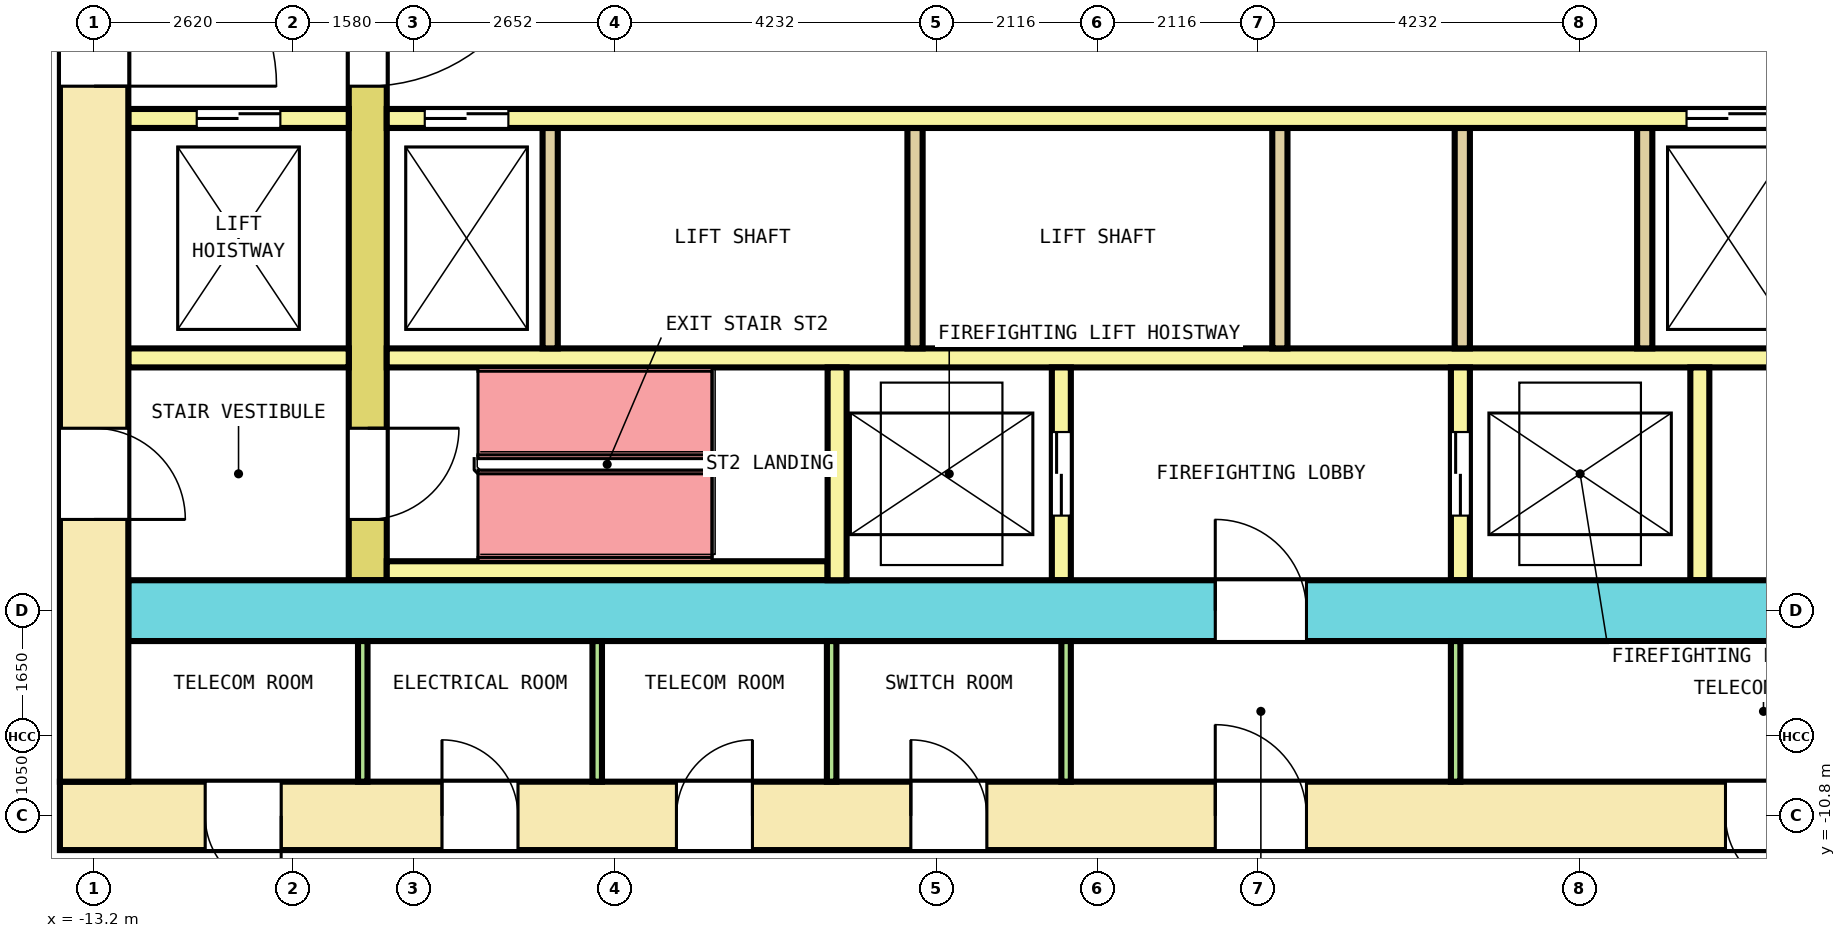
"""IFC4 building model, lengths in metres.
Left out: names, types, materials, properties, quantities, classifications, styles, units other than length and angle.
Written with IfcOpenShell. Run it as: python <this file> out.ifc"""

import sys

from ifc_helpers import new_model, si_unit, direction, frame, frame_2d, origin, place, context, subcontext, project, spatial, rectangle, extrude, element, fill, save


model = new_model("IFC4")
c1 = context("Model", 3, precision=1e-05, world=origin(), true_north=direction((0.0, 1.0)))
c2 = subcontext(c1, "Body", "Model", "MODEL_VIEW")
j1 = project(units=[si_unit("LENGTHUNIT", "METRE"), si_unit("PLANEANGLEUNIT", "RADIAN")], contexts=[c1])
p1 = place(None, origin())
s1 = spatial("IfcSite", under=j1, at=p1, CompositionType="ELEMENT")
p2 = place(p1, origin())
s2 = spatial("IfcBuilding", under=s1, at=p2, CompositionType="ELEMENT")
p3 = place(p2, frame((0.0, 0.0, 49.8)))
s3 = spatial("IfcBuildingStorey", under=s2, at=p3, CompositionType="ELEMENT", Elevation=49.8)
p4 = place(p3, frame((-13.65, -10.8, 0.0), z_axis=(0.0, 0.0, 1.0), x_axis=(1.0, 0.0, 0.0)))
e1 = element("IfcWall", 1, at=p4, inside=s3, PredefinedType="SHEAR", context=c2, shape_type="SweptSolid", body=[
    extrude(rectangle(XDim=27.3, YDim=0.9, at=frame_2d((13.65, 0.0))), origin(), (0.0, 0.0, 1.0), 4.1),
])
p5 = place(p4, frame((1.911, 0.0, 0.0)))
e2 = element("IfcOpeningElement", 2, at=p5, cuts=e1, PredefinedType="OPENING", context=c2, shape_type="SweptSolid", body=[
    extrude(rectangle(XDim=1.0, YDim=2.1, at=frame_2d((0.5, 1.05))), frame((0.0, 0.46, 0.0), z_axis=(0.0, -1.0, 0.0), x_axis=(1.0, 0.0, 0.0)), (0.0, 0.0, 1.0), 0.92),
])
p6 = place(p4, frame((5.027, 0.0, 0.0)))
e3 = element("IfcOpeningElement", 3, at=p6, cuts=e1, PredefinedType="OPENING", context=c2, shape_type="SweptSolid", body=[
    extrude(rectangle(XDim=1.0, YDim=2.1, at=frame_2d((0.5, 1.05))), frame((0.0, 0.46, 0.0), z_axis=(0.0, -1.0, 0.0), x_axis=(1.0, 0.0, 0.0)), (0.0, 0.0, 1.0), 0.92),
])
p7 = place(p4, frame((8.111, 0.0, 0.0)))
e4 = element("IfcOpeningElement", 4, at=p7, cuts=e1, PredefinedType="OPENING", context=c2, shape_type="SweptSolid", body=[
    extrude(rectangle(XDim=1.0, YDim=2.1, at=frame_2d((0.5, 1.05))), frame((0.0, 0.46, 0.0), z_axis=(0.0, -1.0, 0.0), x_axis=(1.0, 0.0, 0.0)), (0.0, 0.0, 1.0), 0.92),
])
p8 = place(p4, frame((11.195, 0.0, 0.0)))
e5 = element("IfcOpeningElement", 5, at=p8, cuts=e1, PredefinedType="OPENING", context=c2, shape_type="SweptSolid", body=[
    extrude(rectangle(XDim=1.0, YDim=2.1, at=frame_2d((0.5, 1.05))), frame((0.0, 0.46, 0.0), z_axis=(0.0, -1.0, 0.0), x_axis=(1.0, 0.0, 0.0)), (0.0, 0.0, 1.0), 0.92),
])
p9 = place(p4, frame((21.913, 0.0, 0.0)))
e6 = element("IfcOpeningElement", 6, at=p9, cuts=e1, PredefinedType="OPENING", context=c2, shape_type="SweptSolid", body=[
    extrude(rectangle(XDim=1.0, YDim=2.1, at=frame_2d((0.5, 1.05))), frame((0.0, 0.46, 0.0), z_axis=(0.0, -1.0, 0.0), x_axis=(1.0, 0.0, 0.0)), (0.0, 0.0, 1.0), 0.92),
])
p10 = place(p4, frame((15.2, 0.0, 0.0)))
e7 = element("IfcOpeningElement", 7, at=p10, cuts=e1, PredefinedType="OPENING", context=c2, shape_type="SweptSolid", body=[
    extrude(rectangle(XDim=1.2, YDim=2.1, at=frame_2d((0.6, 1.05))), frame((0.0, 0.46, 0.0), z_axis=(0.0, -1.0, 0.0), x_axis=(1.0, 0.0, 0.0)), (0.0, 0.0, 1.0), 0.92),
])
p11 = place(p3, frame((-13.2, -10.35, 0.0), z_axis=(0.0, 0.0, 1.0), x_axis=(0.0, 1.0, 0.0)))
e8 = element("IfcWall", 8, at=p11, inside=s3, PredefinedType="SHEAR", context=c2, shape_type="SweptSolid", body=[
    extrude(rectangle(XDim=20.7, YDim=0.9, at=frame_2d((10.35, 0.0))), origin(), (0.0, 0.0, 1.0), 4.1),
])
p12 = place(p11, frame((9.15, 0.0, 0.0)))
e9 = element("IfcOpeningElement", 9, at=p12, cuts=e8, PredefinedType="OPENING", context=c2, shape_type="SweptSolid", body=[
    extrude(rectangle(XDim=2.4, YDim=2.1, at=frame_2d((1.2, 1.05))), frame((0.0, 0.46, 0.0), z_axis=(0.0, -1.0, 0.0), x_axis=(1.0, 0.0, 0.0)), (0.0, 0.0, 1.0), 0.92),
])
p13 = place(p11, frame((16.05, 0.0, 0.0)))
e10 = element("IfcOpeningElement", 10, at=p13, cuts=e8, PredefinedType="OPENING", context=c2, shape_type="SweptSolid", body=[
    extrude(rectangle(XDim=1.2, YDim=2.1, at=frame_2d((0.6, 1.05))), frame((0.0, 0.46, 0.0), z_axis=(0.0, -1.0, 0.0), x_axis=(1.0, 0.0, 0.0)), (0.0, 0.0, 1.0), 0.92),
])
p14 = place(p11, frame((3.45, 0.0, 0.0)))
e11 = element("IfcOpeningElement", 11, at=p14, cuts=e8, PredefinedType="OPENING", context=c2, shape_type="SweptSolid", body=[
    extrude(rectangle(XDim=1.2, YDim=2.1, at=frame_2d((0.6, 1.05))), frame((0.0, 0.46, 0.0), z_axis=(0.0, -1.0, 0.0), x_axis=(1.0, 0.0, 0.0)), (0.0, 0.0, 1.0), 0.92),
])
p15 = place(p3, frame((-12.75, -8.1, 0.0), z_axis=(0.0, 0.0, 1.0), x_axis=(1.0, 0.0, 0.0)))
e12 = element("IfcWall", 12, at=p15, inside=s3, PredefinedType="SHEAR", context=c2, shape_type="SweptSolid", body=[
    extrude(rectangle(XDim=25.5, YDim=0.8, at=frame_2d((12.75, 0.0))), origin(), (0.0, 0.0, 1.0), 4.1),
])
p16 = place(p15, frame((14.3, 0.0, 0.0)))
e13 = element("IfcOpeningElement", 13, at=p16, cuts=e12, PredefinedType="OPENING", context=c2, shape_type="SweptSolid", body=[
    extrude(rectangle(XDim=1.2, YDim=2.1, at=frame_2d((0.6, 1.05))), frame((0.0, 0.41, 0.0), z_axis=(0.0, -1.0, 0.0), x_axis=(1.0, 0.0, 0.0)), (0.0, 0.0, 1.0), 0.82),
])
p17 = place(p3, frame((-9.6, -7.7, 0.0), z_axis=(0.0, 0.0, 1.0), x_axis=(0.0, 1.0, 0.0)))
e14 = element("IfcWall", 14, at=p17, inside=s3, PredefinedType="SHEAR", context=c2, shape_type="SweptSolid", body=[
    extrude(rectangle(XDim=15.4, YDim=0.5, at=frame_2d((7.7, 0.0))), origin(), (0.0, 0.0, 1.0), 4.1),
])
p18 = place(p17, frame((6.5, 0.0, 0.0)))
e15 = element("IfcOpeningElement", 15, at=p18, cuts=e14, PredefinedType="OPENING", context=c2, shape_type="SweptSolid", body=[
    extrude(rectangle(XDim=2.4, YDim=2.1, at=frame_2d((1.2, 1.05))), frame((0.0, 0.26, 0.0), z_axis=(0.0, -1.0, 0.0), x_axis=(1.0, 0.0, 0.0)), (0.0, 0.0, 1.0), 0.52),
])
p19 = place(p17, frame((13.4, 0.0, 0.0)))
e16 = element("IfcOpeningElement", 16, at=p19, cuts=e14, PredefinedType="OPENING", context=c2, shape_type="SweptSolid", body=[
    extrude(rectangle(XDim=1.2, YDim=2.1, at=frame_2d((0.6, 1.05))), frame((0.0, 0.26, 0.0), z_axis=(0.0, -1.0, 0.0), x_axis=(1.0, 0.0, 0.0)), (0.0, 0.0, 1.0), 0.52),
])
p20 = place(p17, frame((0.8, 0.0, 0.0)))
e17 = element("IfcOpeningElement", 17, at=p20, cuts=e14, PredefinedType="OPENING", context=c2, shape_type="SweptSolid", body=[
    extrude(rectangle(XDim=1.2, YDim=2.1, at=frame_2d((0.6, 1.05))), frame((0.0, 0.26, 0.0), z_axis=(0.0, -1.0, 0.0), x_axis=(1.0, 0.0, 0.0)), (0.0, 0.0, 1.0), 0.52),
])
p21 = place(p3, frame((-12.75, -1.625, 0.0), z_axis=(0.0, 0.0, 1.0), x_axis=(1.0, 0.0, 0.0)))
e18 = element("IfcWall", 18, at=p21, inside=s3, PredefinedType="SOLIDWALL", context=c2, shape_type="SweptSolid", body=[
    extrude(rectangle(XDim=2.9, YDim=0.25, at=frame_2d((1.45, 0.0))), origin(), (0.0, 0.0, 1.0), 4.1),
])
p22 = place(p21, frame((0.9, 0.0, 0.0)))
e19 = element("IfcOpeningElement", 19, at=p22, cuts=e18, PredefinedType="OPENING", context=c2, shape_type="SweptSolid", body=[
    extrude(rectangle(XDim=1.1, YDim=2.1, at=frame_2d((0.55, 1.05))), frame((0.0, 0.135, 0.0), z_axis=(0.0, -1.0, 0.0), x_axis=(1.0, 0.0, 0.0)), (0.0, 0.0, 1.0), 0.27),
])
p23 = place(p3, frame((-9.35, -1.625, 0.0), z_axis=(0.0, 0.0, 1.0), x_axis=(1.0, 0.0, 0.0)))
e20 = element("IfcWall", 20, at=p23, inside=s3, PredefinedType="SOLIDWALL", context=c2, shape_type="SweptSolid", body=[
    extrude(rectangle(XDim=18.7, YDim=0.25, at=frame_2d((9.35, 0.0))), origin(), (0.0, 0.0, 1.0), 4.1),
])
p24 = place(p23, frame((0.5, 0.0, 0.0)))
e21 = element("IfcOpeningElement", 21, at=p24, cuts=e20, PredefinedType="OPENING", context=c2, shape_type="SweptSolid", body=[
    extrude(rectangle(XDim=1.1, YDim=2.1, at=frame_2d((0.55, 1.05))), frame((0.0, 0.135, 0.0), z_axis=(0.0, -1.0, 0.0), x_axis=(1.0, 0.0, 0.0)), (0.0, 0.0, 1.0), 0.27),
])
p25 = place(p23, frame((17.1, 0.0, 0.0)))
e22 = element("IfcOpeningElement", 22, at=p25, cuts=e20, PredefinedType="OPENING", context=c2, shape_type="SweptSolid", body=[
    extrude(rectangle(XDim=1.1, YDim=2.1, at=frame_2d((0.55, 1.05))), frame((0.0, 0.135, 0.0), z_axis=(0.0, -1.0, 0.0), x_axis=(1.0, 0.0, 0.0)), (0.0, 0.0, 1.0), 0.27),
])
p26 = place(p3, frame((-12.75, -4.775, 0.0), z_axis=(0.0, 0.0, 1.0), x_axis=(1.0, 0.0, 0.0)))
e23 = element("IfcWall", 23, at=p26, inside=s3, PredefinedType="SOLIDWALL", context=c2, shape_type="SweptSolid", body=[
    extrude(rectangle(XDim=2.9, YDim=0.25, at=frame_2d((1.45, 0.0))), origin(), (0.0, 0.0, 1.0), 4.1),
])
p27 = place(p3, frame((-9.35, -4.775, 0.0), z_axis=(0.0, 0.0, 1.0), x_axis=(1.0, 0.0, 0.0)))
e24 = element("IfcWall", 24, at=p27, inside=s3, PredefinedType="SOLIDWALL", context=c2, shape_type="SweptSolid", body=[
    extrude(rectangle(XDim=18.7, YDim=0.25, at=frame_2d((9.35, 0.0))), origin(), (0.0, 0.0, 1.0), 4.1),
])
for number, where, z_axis, x_axis in (
    (25, (-7.2, -4.65, 0.0), (0.0, 0.0, 1.0), (0.0, 1.0, 0.0)),
    (26, (-2.4, -4.65, 0.0), (0.0, 0.0, 1.0), (0.0, 1.0, 0.0)),
    (27, (2.4, -4.65, 0.0), (0.0, 0.0, 1.0), (0.0, 1.0, 0.0)),
    (28, (4.8, -4.65, 0.0), (0.0, 0.0, 1.0), (0.0, 1.0, 0.0)),
    (29, (7.2, -4.65, 0.0), (0.0, 0.0, 1.0), (0.0, 1.0, 0.0)),
):
    element("IfcWall", number, at=place(p3, frame(where, z_axis=z_axis, x_axis=x_axis)), inside=s3, PredefinedType="SOLIDWALL", context=c2, shape_type="SweptSolid", body=[
        extrude(rectangle(XDim=2.9, YDim=0.2, at=frame_2d((1.45, 0.0))), origin(), (0.0, 0.0, 1.0), 4.1),
    ])
p28 = place(p3, frame((-9.35, -7.575, 0.0), z_axis=(0.0, 0.0, 1.0), x_axis=(1.0, 0.0, 0.0)))
e30 = element("IfcWall", 30, at=p28, inside=s3, PredefinedType="SOLIDWALL", context=c2, shape_type="SweptSolid", body=[
    extrude(rectangle(XDim=5.8, YDim=0.25, at=frame_2d((2.9, 0.0))), origin(), (0.0, 0.0, 1.0), 4.1),
])
p29 = place(p3, frame((-3.425, -7.7, 0.0), z_axis=(0.0, 0.0, 1.0), x_axis=(0.0, 1.0, 0.0)))
e31 = element("IfcWall", 31, at=p29, inside=s3, PredefinedType="SOLIDWALL", context=c2, shape_type="SweptSolid", body=[
    extrude(rectangle(XDim=2.8, YDim=0.25, at=frame_2d((1.4, 0.0))), origin(), (0.0, 0.0, 1.0), 4.1),
])
p30 = place(p3, frame((-0.475, -7.7, 0.0), z_axis=(0.0, 0.0, 1.0), x_axis=(0.0, 1.0, 0.0)))
e32 = element("IfcWall", 32, at=p30, inside=s3, PredefinedType="SOLIDWALL", context=c2, shape_type="SweptSolid", body=[
    extrude(rectangle(XDim=2.8, YDim=0.25, at=frame_2d((1.4, 0.0))), origin(), (0.0, 0.0, 1.0), 4.1),
])
p31 = place(p30, frame((0.85, 0.0, 0.0)))
e33 = element("IfcOpeningElement", 33, at=p31, cuts=e32, PredefinedType="OPENING", context=c2, shape_type="SweptSolid", body=[
    extrude(rectangle(XDim=1.1, YDim=2.1, at=frame_2d((0.55, 1.05))), frame((0.0, 0.135, 0.0), z_axis=(0.0, -1.0, 0.0), x_axis=(1.0, 0.0, 0.0)), (0.0, 0.0, 1.0), 0.27),
])
p32 = place(p3, frame((4.775, -7.7, 0.0), z_axis=(0.0, 0.0, 1.0), x_axis=(0.0, 1.0, 0.0)))
e34 = element("IfcWall", 34, at=p32, inside=s3, PredefinedType="SOLIDWALL", context=c2, shape_type="SweptSolid", body=[
    extrude(rectangle(XDim=2.8, YDim=0.25, at=frame_2d((1.4, 0.0))), origin(), (0.0, 0.0, 1.0), 4.1),
])
p33 = place(p32, frame((0.85, 0.0, 0.0)))
e35 = element("IfcOpeningElement", 35, at=p33, cuts=e34, PredefinedType="OPENING", context=c2, shape_type="SweptSolid", body=[
    extrude(rectangle(XDim=1.1, YDim=2.1, at=frame_2d((0.55, 1.05))), frame((0.0, 0.135, 0.0), z_axis=(0.0, -1.0, 0.0), x_axis=(1.0, 0.0, 0.0)), (0.0, 0.0, 1.0), 0.27),
])
p34 = place(p3, frame((7.925, -7.7, 0.0), z_axis=(0.0, 0.0, 1.0), x_axis=(0.0, 1.0, 0.0)))
e36 = element("IfcWall", 36, at=p34, inside=s3, PredefinedType="SOLIDWALL", context=c2, shape_type="SweptSolid", body=[
    extrude(rectangle(XDim=2.8, YDim=0.25, at=frame_2d((1.4, 0.0))), origin(), (0.0, 0.0, 1.0), 4.1),
])
for number, where, z_axis, x_axis in (
    (37, (-9.666, -10.35, 0.0), (0.0, 0.0, 1.0), (0.0, 1.0, 0.0)),
    (38, (-6.581, -10.35, 0.0), (0.0, 0.0, 1.0), (0.0, 1.0, 0.0)),
    (39, (-3.497, -10.35, 0.0), (0.0, 0.0, 1.0), (0.0, 1.0, 0.0)),
    (40, (-0.413, -10.35, 0.0), (0.0, 0.0, 1.0), (0.0, 1.0, 0.0)),
    (41, (4.712, -10.35, 0.0), (0.0, 0.0, 1.0), (0.0, 1.0, 0.0)),
):
    element("IfcWall", number, at=place(p3, frame(where, z_axis=z_axis, x_axis=x_axis)), inside=s3, PredefinedType="PARTITIONING", context=c2, shape_type="SweptSolid", body=[
        extrude(rectangle(XDim=1.85, YDim=0.125, at=frame_2d((0.925, 0.0))), origin(), (0.0, 0.0, 1.0), 4.1),
    ])
p35 = place(p22, origin())
e42 = element("IfcDoor", 42, at=p35, inside=s3, OperationType="DOUBLE_DOOR_SLIDING", PredefinedType="DOOR", context=c2, shape_type="SweptSolid", body=[
    extrude(rectangle(XDim=1.1, YDim=2.1, at=frame_2d((0.55, 1.05))), frame((0.0, 0.075, 0.0), z_axis=(0.0, -1.0, 0.0), x_axis=(1.0, 0.0, 0.0)), (0.0, 0.0, 1.0), 0.15),
])
fill(e19, e42)
p36 = place(p24, origin())
e43 = element("IfcDoor", 43, at=p36, inside=s3, OperationType="DOUBLE_DOOR_SLIDING", PredefinedType="DOOR", context=c2, shape_type="SweptSolid", body=[
    extrude(rectangle(XDim=1.1, YDim=2.1, at=frame_2d((0.55, 1.05))), frame((0.0, 0.075, 0.0), z_axis=(0.0, -1.0, 0.0), x_axis=(1.0, 0.0, 0.0)), (0.0, 0.0, 1.0), 0.15),
])
fill(e21, e43)
p37 = place(p25, origin())
e44 = element("IfcDoor", 44, at=p37, inside=s3, OperationType="DOUBLE_DOOR_SLIDING", PredefinedType="DOOR", context=c2, shape_type="SweptSolid", body=[
    extrude(rectangle(XDim=1.1, YDim=2.1, at=frame_2d((0.55, 1.05))), frame((0.0, 0.075, 0.0), z_axis=(0.0, -1.0, 0.0), x_axis=(1.0, 0.0, 0.0)), (0.0, 0.0, 1.0), 0.15),
])
fill(e22, e44)
p38 = place(p31, origin())
e45 = element("IfcDoor", 45, at=p38, inside=s3, OperationType="DOUBLE_DOOR_SLIDING", PredefinedType="DOOR", context=c2, shape_type="SweptSolid", body=[
    extrude(rectangle(XDim=1.1, YDim=2.1, at=frame_2d((0.55, 1.05))), frame((0.0, 0.075, 0.0), z_axis=(0.0, -1.0, 0.0), x_axis=(1.0, 0.0, 0.0)), (0.0, 0.0, 1.0), 0.15),
])
fill(e33, e45)
p39 = place(p33, origin())
e46 = element("IfcDoor", 46, at=p39, inside=s3, OperationType="DOUBLE_DOOR_SLIDING", PredefinedType="DOOR", context=c2, shape_type="SweptSolid", body=[
    extrude(rectangle(XDim=1.1, YDim=2.1, at=frame_2d((0.55, 1.05))), frame((0.0, 0.075, 0.0), z_axis=(0.0, -1.0, 0.0), x_axis=(1.0, 0.0, 0.0)), (0.0, 0.0, 1.0), 0.15),
])
fill(e35, e46)
p40 = place(p18, origin())
e47 = element("IfcDoor", 47, at=p40, inside=s3, OperationType="DOUBLE_DOOR_SINGLE_SWING", PredefinedType="DOOR", context=c2, shape_type="SweptSolid", body=[
    extrude(rectangle(XDim=2.4, YDim=2.1, at=frame_2d((1.2, 1.05))), frame((0.0, 0.2, 0.0), z_axis=(0.0, -1.0, 0.0), x_axis=(1.0, 0.0, 0.0)), (0.0, 0.0, 1.0), 0.4),
])
fill(e15, e47)
p41 = place(p12, origin())
e48 = element("IfcDoor", 48, at=p41, inside=s3, OperationType="DOUBLE_DOOR_SINGLE_SWING", PredefinedType="DOOR", context=c2, shape_type="SweptSolid", body=[
    extrude(rectangle(XDim=2.4, YDim=2.1, at=frame_2d((1.2, 1.05))), frame((0.0, 0.3, 0.0), z_axis=(0.0, -1.0, 0.0), x_axis=(1.0, 0.0, 0.0)), (0.0, 0.0, 1.0), 0.6),
])
fill(e9, e48)
p42 = place(p20, origin())
e49 = element("IfcDoor", 49, at=p42, inside=s3, OperationType="SINGLE_SWING_RIGHT", PredefinedType="DOOR", context=c2, shape_type="SweptSolid", body=[
    extrude(rectangle(XDim=1.2, YDim=2.1, at=frame_2d((0.6, 1.05))), frame((0.0, 0.2, 0.0), z_axis=(0.0, -1.0, 0.0), x_axis=(1.0, 0.0, 0.0)), (0.0, 0.0, 1.0), 0.4),
])
fill(e17, e49)
p43 = place(p14, origin())
e50 = element("IfcDoor", 50, at=p43, inside=s3, OperationType="SINGLE_SWING_LEFT", PredefinedType="DOOR", context=c2, shape_type="SweptSolid", body=[
    extrude(rectangle(XDim=1.2, YDim=2.1, at=frame_2d((0.6, 1.05))), frame((0.0, 0.3, 0.0), z_axis=(0.0, -1.0, 0.0), x_axis=(1.0, 0.0, 0.0)), (0.0, 0.0, 1.0), 0.6),
])
fill(e11, e50)
p44 = place(p16, origin())
e51 = element("IfcDoor", 51, at=p44, inside=s3, OperationType="SINGLE_SWING_RIGHT", PredefinedType="DOOR", context=c2, shape_type="SweptSolid", body=[
    extrude(rectangle(XDim=1.2, YDim=2.1, at=frame_2d((0.6, 1.05))), frame((0.0, 0.3, 0.0), z_axis=(0.0, -1.0, 0.0), x_axis=(1.0, 0.0, 0.0)), (0.0, 0.0, 1.0), 0.6),
])
fill(e13, e51)
p45 = place(p5, origin())
e52 = element("IfcDoor", 52, at=p45, inside=s3, OperationType="SINGLE_SWING_LEFT", PredefinedType="DOOR", context=c2, shape_type="SweptSolid", body=[
    extrude(rectangle(XDim=1.0, YDim=2.1, at=frame_2d((0.5, 1.05))), frame((0.0, 0.3, 0.0), z_axis=(0.0, -1.0, 0.0), x_axis=(1.0, 0.0, 0.0)), (0.0, 0.0, 1.0), 0.6),
])
fill(e2, e52)
p46 = place(p6, origin())
e53 = element("IfcDoor", 53, at=p46, inside=s3, OperationType="SINGLE_SWING_RIGHT", PredefinedType="DOOR", context=c2, shape_type="SweptSolid", body=[
    extrude(rectangle(XDim=1.0, YDim=2.1, at=frame_2d((0.5, 1.05))), frame((0.0, 0.3, 0.0), z_axis=(0.0, -1.0, 0.0), x_axis=(1.0, 0.0, 0.0)), (0.0, 0.0, 1.0), 0.6),
])
fill(e3, e53)
p47 = place(p7, origin())
e54 = element("IfcDoor", 54, at=p47, inside=s3, OperationType="SINGLE_SWING_LEFT", PredefinedType="DOOR", context=c2, shape_type="SweptSolid", body=[
    extrude(rectangle(XDim=1.0, YDim=2.1, at=frame_2d((0.5, 1.05))), frame((0.0, 0.3, 0.0), z_axis=(0.0, -1.0, 0.0), x_axis=(1.0, 0.0, 0.0)), (0.0, 0.0, 1.0), 0.6),
])
fill(e4, e54)
p48 = place(p8, origin())
e55 = element("IfcDoor", 55, at=p48, inside=s3, OperationType="SINGLE_SWING_RIGHT", PredefinedType="DOOR", context=c2, shape_type="SweptSolid", body=[
    extrude(rectangle(XDim=1.0, YDim=2.1, at=frame_2d((0.5, 1.05))), frame((0.0, 0.3, 0.0), z_axis=(0.0, -1.0, 0.0), x_axis=(1.0, 0.0, 0.0)), (0.0, 0.0, 1.0), 0.6),
])
fill(e5, e55)
p49 = place(p9, origin())
e56 = element("IfcDoor", 56, at=p49, inside=s3, OperationType="SINGLE_SWING_LEFT", PredefinedType="DOOR", context=c2, shape_type="SweptSolid", body=[
    extrude(rectangle(XDim=1.0, YDim=2.1, at=frame_2d((0.5, 1.05))), frame((0.0, 0.3, 0.0), z_axis=(0.0, -1.0, 0.0), x_axis=(1.0, 0.0, 0.0)), (0.0, 0.0, 1.0), 0.6),
])
fill(e6, e56)
p50 = place(p10, origin())
e57 = element("IfcDoor", 57, at=p50, inside=s3, OperationType="SINGLE_SWING_RIGHT", PredefinedType="DOOR", context=c2, shape_type="SweptSolid", body=[
    extrude(rectangle(XDim=1.2, YDim=2.1, at=frame_2d((0.6, 1.05))), frame((0.0, 0.3, 0.0), z_axis=(0.0, -1.0, 0.0), x_axis=(1.0, 0.0, 0.0)), (0.0, 0.0, 1.0), 0.6),
])
fill(e7, e57)
save(model, sys.argv[1])
